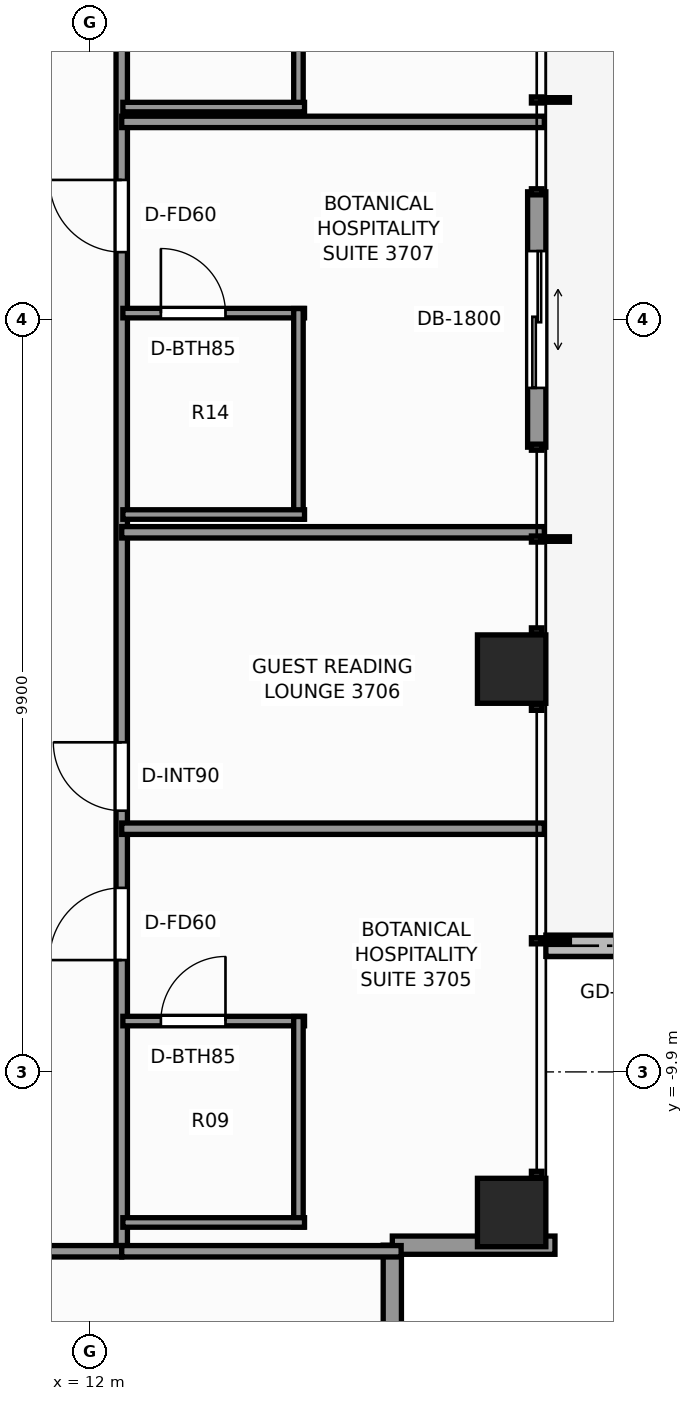
"""IFC4 building model, lengths in metres.
Left out: names, types, materials, properties, quantities, classifications, styles, units other than length and angle.
Written with IfcOpenShell. Run it as: python <this file> out.ifc"""

import sys

from ifc_helpers import new_model, si_unit, direction, frame, frame_2d, origin, origin_2d, place, context, subcontext, project, spatial, rectangle, extrude, element, fill, save


model = new_model("IFC4")
c1 = context("Model", 3, precision=1e-05, world=origin(), true_north=direction((0.0, 1.0)))
c2 = subcontext(c1, "Body", "Model", "MODEL_VIEW")
j1 = project(units=[si_unit("LENGTHUNIT", "METRE"), si_unit("PLANEANGLEUNIT", "RADIAN")], contexts=[c1])
p1 = place(None, origin())
s1 = spatial("IfcSite", under=j1, at=p1, CompositionType="ELEMENT")
p2 = place(p1, origin())
s2 = spatial("IfcBuilding", under=s1, at=p2, CompositionType="ELEMENT")
p3 = place(p2, frame((0.0, 0.0, 128.3)))
s3 = spatial("IfcBuildingStorey", under=s2, at=p3, CompositionType="ELEMENT", Elevation=128.3)
for number, where, z_axis, x_axis in (
    (1, (17.55, -11.75, 0.0), (0.0, 0.0, 1.0), (1.0, 0.0, 0.0)),
    (2, (17.55, -4.6, 0.0), (0.0, 0.0, 1.0), (1.0, 0.0, 0.0)),
):
    element("IfcColumn", number, at=place(p3, frame(where, z_axis=z_axis, x_axis=x_axis)), inside=s3, PredefinedType="COLUMN", context=c2, shape_type="SweptSolid", body=[
        extrude(rectangle(XDim=0.9, YDim=0.9, at=origin_2d()), origin(), (0.0, 0.0, 1.0), 3.3),
    ])
p4 = place(p3, frame((18.0, -8.24, -0.02), z_axis=(0.0, 0.0, 1.0), x_axis=(1.0, 0.0, 0.0)))
e3 = element("IfcWall", 3, at=p4, inside=s3, PredefinedType="PARAPET", context=c2, shape_type="SweptSolid", body=[
    extrude(rectangle(XDim=1.705, YDim=0.28, at=frame_2d((0.853, 0.0))), origin(), (0.0, 0.0, 1.0), 0.42),
])
for number, where, z_axis, x_axis in (
    (4, (15.98, -12.18, 0.0), (0.0, 0.0, 1.0), (0.0, -1.0, 0.0)),
    (5, (18.12, -12.18, 0.0), (0.0, 0.0, 1.0), (-1.0, 0.0, 0.0)),
):
    element("IfcWall", number, at=place(p3, frame(where, z_axis=z_axis, x_axis=x_axis)), inside=s3, PredefinedType="STANDARD", context=c2, shape_type="SweptSolid", body=[
        extrude(rectangle(XDim=2.14, YDim=0.24, at=frame_2d((1.07, 0.0))), origin(), (0.0, 0.0, 1.0), 2.479),
    ])
p5 = place(p3, frame((17.88, 1.68, 0.0), z_axis=(0.0, 0.0, 1.0), x_axis=(0.0, -1.0, 0.0)))
e6 = element("IfcWall", 6, at=p5, inside=s3, PredefinedType="STANDARD", context=c2, shape_type="SweptSolid", body=[
    extrude(rectangle(XDim=3.36, YDim=0.24, at=frame_2d((1.68, 0.0))), origin(), (0.0, 0.0, 1.0), 3.1),
])
p6 = place(p5, frame((0.78, 0.0, 0.0)))
e7 = element("IfcOpeningElement", 7, at=p6, cuts=e6, PredefinedType="OPENING", context=c2, shape_type="SweptSolid", body=[
    extrude(rectangle(XDim=1.8, YDim=2.2, at=frame_2d((0.9, 1.1))), frame((0.0, 0.13, 0.0), z_axis=(0.0, -1.0, 0.0), x_axis=(1.0, 0.0, 0.0)), (0.0, 0.0, 1.0), 0.26),
])
p7 = place(p3, frame((12.42, -12.26, 0.0), z_axis=(0.0, 0.0, 1.0), x_axis=(0.0, 1.0, 0.0)))
e8 = element("IfcWall", 8, at=p7, inside=s3, PredefinedType="PARTITIONING", context=c2, shape_type="SweptSolid", body=[
    extrude(rectangle(XDim=24.84, YDim=0.15, at=frame_2d((12.42, 0.0))), origin(), (0.0, 0.0, 1.0), 2.312),
])
p8 = place(p7, frame((3.831, 0.0, 0.0)))
e9 = element("IfcOpeningElement", 9, at=p8, cuts=e8, PredefinedType="OPENING", context=c2, shape_type="SweptSolid", body=[
    extrude(rectangle(XDim=0.95, YDim=2.06, at=frame_2d((0.475, 1.03))), frame((0.0, 0.085, 0.0), z_axis=(0.0, -1.0, 0.0), x_axis=(1.0, 0.0, 0.0)), (0.0, 0.0, 1.0), 0.17),
])
p9 = place(p7, frame((5.797, 0.0, 0.0)))
e10 = element("IfcOpeningElement", 10, at=p9, cuts=e8, PredefinedType="OPENING", context=c2, shape_type="SweptSolid", body=[
    extrude(rectangle(XDim=0.9, YDim=2.06, at=frame_2d((0.45, 1.03))), frame((0.0, 0.085, 0.0), z_axis=(0.0, -1.0, 0.0), x_axis=(1.0, 0.0, 0.0)), (0.0, 0.0, 1.0), 0.17),
])
p10 = place(p7, frame((13.146, 0.0, 0.0)))
e11 = element("IfcOpeningElement", 11, at=p10, cuts=e8, PredefinedType="OPENING", context=c2, shape_type="SweptSolid", body=[
    extrude(rectangle(XDim=0.95, YDim=2.06, at=frame_2d((0.475, 1.03))), frame((0.0, 0.085, 0.0), z_axis=(0.0, -1.0, 0.0), x_axis=(1.0, 0.0, 0.0)), (0.0, 0.0, 1.0), 0.17),
])
p11 = place(p7, frame((18.673, 0.0, 0.0)))
e12 = element("IfcOpeningElement", 12, at=p11, cuts=e8, PredefinedType="OPENING", context=c2, shape_type="SweptSolid", body=[
    extrude(rectangle(XDim=0.95, YDim=2.06, at=frame_2d((0.475, 1.03))), frame((0.0, 0.085, 0.0), z_axis=(0.0, -1.0, 0.0), x_axis=(1.0, 0.0, 0.0)), (0.0, 0.0, 1.0), 0.17),
])
p12 = place(p7, frame((20.836, 0.0, 0.0)))
e13 = element("IfcOpeningElement", 13, at=p12, cuts=e8, PredefinedType="OPENING", context=c2, shape_type="SweptSolid", body=[
    extrude(rectangle(XDim=0.9, YDim=2.06, at=frame_2d((0.45, 1.03))), frame((0.0, 0.085, 0.0), z_axis=(0.0, -1.0, 0.0), x_axis=(1.0, 0.0, 0.0)), (0.0, 0.0, 1.0), 0.17),
])
p13 = place(p3, frame((-3.65, -12.26, 0.0), z_axis=(0.0, 0.0, 1.0), x_axis=(1.0, 0.0, 0.0)))
e14 = element("IfcWall", 14, at=p13, inside=s3, PredefinedType="PARTITIONING", context=c2, shape_type="SweptSolid", body=[
    extrude(rectangle(XDim=16.07, YDim=0.15, at=frame_2d((8.035, 0.0))), origin(), (0.0, 0.0, 1.0), 2.312),
])
p14 = place(p13, frame((0.936, 0.0, 0.0)))
e15 = element("IfcOpeningElement", 15, at=p14, cuts=e14, PredefinedType="OPENING", context=c2, shape_type="SweptSolid", body=[
    extrude(rectangle(XDim=0.95, YDim=2.06, at=frame_2d((0.475, 1.03))), frame((0.0, 0.085, 0.0), z_axis=(0.0, -1.0, 0.0), x_axis=(1.0, 0.0, 0.0)), (0.0, 0.0, 1.0), 0.17),
])
p15 = place(p13, frame((9.893, 0.0, 0.0)))
e16 = element("IfcOpeningElement", 16, at=p15, cuts=e14, PredefinedType="OPENING", context=c2, shape_type="SweptSolid", body=[
    extrude(rectangle(XDim=0.95, YDim=2.06, at=frame_2d((0.475, 1.03))), frame((0.0, 0.085, 0.0), z_axis=(0.0, -1.0, 0.0), x_axis=(1.0, 0.0, 0.0)), (0.0, 0.0, 1.0), 0.17),
])
p16 = place(p13, frame((12.253, 0.0, 0.0)))
e17 = element("IfcOpeningElement", 17, at=p16, cuts=e14, PredefinedType="OPENING", context=c2, shape_type="SweptSolid", body=[
    extrude(rectangle(XDim=0.9, YDim=2.06, at=frame_2d((0.45, 1.03))), frame((0.0, 0.085, 0.0), z_axis=(0.0, -1.0, 0.0), x_axis=(1.0, 0.0, 0.0)), (0.0, 0.0, 1.0), 0.17),
])
p17 = place(p3, frame((12.42, -12.26, 0.0), z_axis=(0.0, 0.0, 1.0), x_axis=(1.0, 0.0, 0.0)))
e18 = element("IfcWall", 18, at=p17, inside=s3, PredefinedType="PARTITIONING", context=c2, shape_type="SweptSolid", body=[
    extrude(rectangle(XDim=3.676, YDim=0.15, at=frame_2d((1.838, 0.0))), origin(), (0.0, 0.0, 1.0), 3.1),
])
p18 = place(p3, frame((12.42, -6.7, 0.0), z_axis=(0.0, 0.0, 1.0), x_axis=(1.0, 0.0, 0.0)))
e19 = element("IfcWall", 19, at=p18, inside=s3, PredefinedType="PARTITIONING", context=c2, shape_type="SweptSolid", body=[
    extrude(rectangle(XDim=5.56, YDim=0.15, at=frame_2d((2.78, 0.0))), origin(), (0.0, 0.0, 1.0), 2.469),
])
p19 = place(p3, frame((12.435, -9.231, 0.0), z_axis=(0.0, 0.0, 1.0), x_axis=(1.0, 0.0, 0.0)))
e20 = element("IfcWall", 20, at=p19, inside=s3, PredefinedType="PARTITIONING", context=c2, shape_type="SweptSolid", body=[
    extrude(rectangle(XDim=2.39, YDim=0.125, at=frame_2d((1.195, 0.0))), origin(), (0.0, 0.0, 1.0), 3.1),
])
p20 = place(p19, frame((0.5, 0.0, 0.0)))
e21 = element("IfcOpeningElement", 21, at=p20, cuts=e20, PredefinedType="OPENING", context=c2, shape_type="SweptSolid", body=[
    extrude(rectangle(XDim=0.85, YDim=2.03, at=frame_2d((0.425, 1.015))), frame((0.0, 0.073, 0.0), z_axis=(0.0, -1.0, 0.0), x_axis=(1.0, 0.0, 0.0)), (0.0, 0.0, 1.0), 0.145),
])
p21 = place(p3, frame((14.745, -11.941, 0.0), z_axis=(0.0, 0.0, 1.0), x_axis=(0.0, 1.0, 0.0)))
e22 = element("IfcWall", 22, at=p21, inside=s3, PredefinedType="PARTITIONING", context=c2, shape_type="SweptSolid", body=[
    extrude(rectangle(XDim=2.77, YDim=0.125, at=frame_2d((1.385, 0.0))), origin(), (0.0, 0.0, 1.0), 2.312),
])
p22 = place(p3, frame((12.435, -11.881, 0.0), z_axis=(0.0, 0.0, 1.0), x_axis=(1.0, 0.0, 0.0)))
e23 = element("IfcWall", 23, at=p22, inside=s3, PredefinedType="PARTITIONING", context=c2, shape_type="SweptSolid", body=[
    extrude(rectangle(XDim=2.39, YDim=0.125, at=frame_2d((1.195, 0.0))), origin(), (0.0, 0.0, 1.0), 3.1),
])
for number, where, z_axis, x_axis in (
    (24, (12.42, -2.8, 0.0), (0.0, 0.0, 1.0), (1.0, 0.0, 0.0)),
    (25, (12.42, 2.6, 0.0), (0.0, 0.0, 1.0), (1.0, 0.0, 0.0)),
):
    element("IfcWall", number, at=place(p3, frame(where, z_axis=z_axis, x_axis=x_axis)), inside=s3, PredefinedType="PARTITIONING", context=c2, shape_type="SweptSolid", body=[
        extrude(rectangle(XDim=5.56, YDim=0.15, at=frame_2d((2.78, 0.0))), origin(), (0.0, 0.0, 1.0), 2.469),
    ])
p23 = place(p3, frame((12.435, 0.084, 0.0), z_axis=(0.0, 0.0, 1.0), x_axis=(1.0, 0.0, 0.0)))
e26 = element("IfcWall", 26, at=p23, inside=s3, PredefinedType="PARTITIONING", context=c2, shape_type="SweptSolid", body=[
    extrude(rectangle(XDim=2.39, YDim=0.125, at=frame_2d((1.195, 0.0))), origin(), (0.0, 0.0, 1.0), 2.625),
])
p24 = place(p23, frame((0.5, 0.0, 0.0)))
e27 = element("IfcOpeningElement", 27, at=p24, cuts=e26, PredefinedType="OPENING", context=c2, shape_type="SweptSolid", body=[
    extrude(rectangle(XDim=0.85, YDim=2.03, at=frame_2d((0.425, 1.015))), frame((0.0, 0.073, 0.0), z_axis=(0.0, -1.0, 0.0), x_axis=(1.0, 0.0, 0.0)), (0.0, 0.0, 1.0), 0.145),
])
p25 = place(p3, frame((14.745, -2.626, 0.0), z_axis=(0.0, 0.0, 1.0), x_axis=(0.0, 1.0, 0.0)))
e28 = element("IfcWall", 28, at=p25, inside=s3, PredefinedType="PARTITIONING", context=c2, shape_type="SweptSolid", body=[
    extrude(rectangle(XDim=2.77, YDim=0.125, at=frame_2d((1.385, 0.0))), origin(), (0.0, 0.0, 1.0), 2.625),
])
p26 = place(p3, frame((12.435, -2.566, 0.0), z_axis=(0.0, 0.0, 1.0), x_axis=(1.0, 0.0, 0.0)))
e29 = element("IfcWall", 29, at=p26, inside=s3, PredefinedType="PARTITIONING", context=c2, shape_type="SweptSolid", body=[
    extrude(rectangle(XDim=2.39, YDim=0.125, at=frame_2d((1.195, 0.0))), origin(), (0.0, 0.0, 1.0), 3.1),
])
p27 = place(p3, frame((14.745, 2.735, 0.0), z_axis=(0.0, 0.0, 1.0), x_axis=(0.0, 1.0, 0.0)))
e30 = element("IfcWall", 30, at=p27, inside=s3, PredefinedType="PARTITIONING", context=c2, shape_type="SweptSolid", body=[
    extrude(rectangle(XDim=2.77, YDim=0.125, at=frame_2d((1.385, 0.0))), origin(), (0.0, 0.0, 1.0), 2.312),
])
p28 = place(p3, frame((12.435, 2.795, 0.0), z_axis=(0.0, 0.0, 1.0), x_axis=(1.0, 0.0, 0.0)))
e31 = element("IfcWall", 31, at=p28, inside=s3, PredefinedType="PARTITIONING", context=c2, shape_type="SweptSolid", body=[
    extrude(rectangle(XDim=2.39, YDim=0.125, at=frame_2d((1.195, 0.0))), origin(), (0.0, 0.0, 1.0), 3.1),
])
p29 = place(p6, origin())
e32 = element("IfcDoor", 32, at=p29, inside=s3, OperationType="DOUBLE_DOOR_SLIDING", PredefinedType="DOOR", context=c2, shape_type="SweptSolid", body=[
    extrude(rectangle(XDim=1.8, YDim=2.2, at=frame_2d((0.9, 1.1))), frame((0.0, 0.025, 0.0), z_axis=(0.0, -1.0, 0.0), x_axis=(1.0, 0.0, 0.0)), (0.0, 0.0, 1.0), 0.05),
])
fill(e7, e32)
p30 = place(p20, origin())
e33 = element("IfcDoor", 33, at=p30, inside=s3, OperationType="SINGLE_SWING_RIGHT", PredefinedType="DOOR", context=c2, shape_type="SweptSolid", body=[
    extrude(rectangle(XDim=0.85, YDim=2.03, at=frame_2d((0.425, 1.015))), frame((0.0, 0.025, 0.0), z_axis=(0.0, -1.0, 0.0), x_axis=(1.0, 0.0, 0.0)), (0.0, 0.0, 1.0), 0.05),
])
fill(e21, e33)
p31 = place(p8, origin())
e34 = element("IfcDoor", 34, at=p31, inside=s3, OperationType="SINGLE_SWING_LEFT", PredefinedType="DOOR", context=c2, shape_type="SweptSolid", body=[
    extrude(rectangle(XDim=0.95, YDim=2.06, at=frame_2d((0.475, 1.03))), frame((0.0, 0.025, 0.0), z_axis=(0.0, -1.0, 0.0), x_axis=(1.0, 0.0, 0.0)), (0.0, 0.0, 1.0), 0.05),
])
fill(e9, e34)
p32 = place(p9, origin())
e35 = element("IfcDoor", 35, at=p32, inside=s3, OperationType="SINGLE_SWING_RIGHT", PredefinedType="DOOR", context=c2, shape_type="SweptSolid", body=[
    extrude(rectangle(XDim=0.9, YDim=2.06, at=frame_2d((0.45, 1.03))), frame((0.0, 0.025, 0.0), z_axis=(0.0, -1.0, 0.0), x_axis=(1.0, 0.0, 0.0)), (0.0, 0.0, 1.0), 0.05),
])
fill(e10, e35)
p33 = place(p24, origin())
e36 = element("IfcDoor", 36, at=p33, inside=s3, OperationType="SINGLE_SWING_LEFT", PredefinedType="DOOR", context=c2, shape_type="SweptSolid", body=[
    extrude(rectangle(XDim=0.85, YDim=2.03, at=frame_2d((0.425, 1.015))), frame((0.0, 0.025, 0.0), z_axis=(0.0, -1.0, 0.0), x_axis=(1.0, 0.0, 0.0)), (0.0, 0.0, 1.0), 0.05),
])
fill(e27, e36)
p34 = place(p10, origin())
e37 = element("IfcDoor", 37, at=p34, inside=s3, OperationType="SINGLE_SWING_RIGHT", PredefinedType="DOOR", context=c2, shape_type="SweptSolid", body=[
    extrude(rectangle(XDim=0.95, YDim=2.06, at=frame_2d((0.475, 1.03))), frame((0.0, 0.025, 0.0), z_axis=(0.0, -1.0, 0.0), x_axis=(1.0, 0.0, 0.0)), (0.0, 0.0, 1.0), 0.05),
])
fill(e11, e37)
save(model, sys.argv[1])
